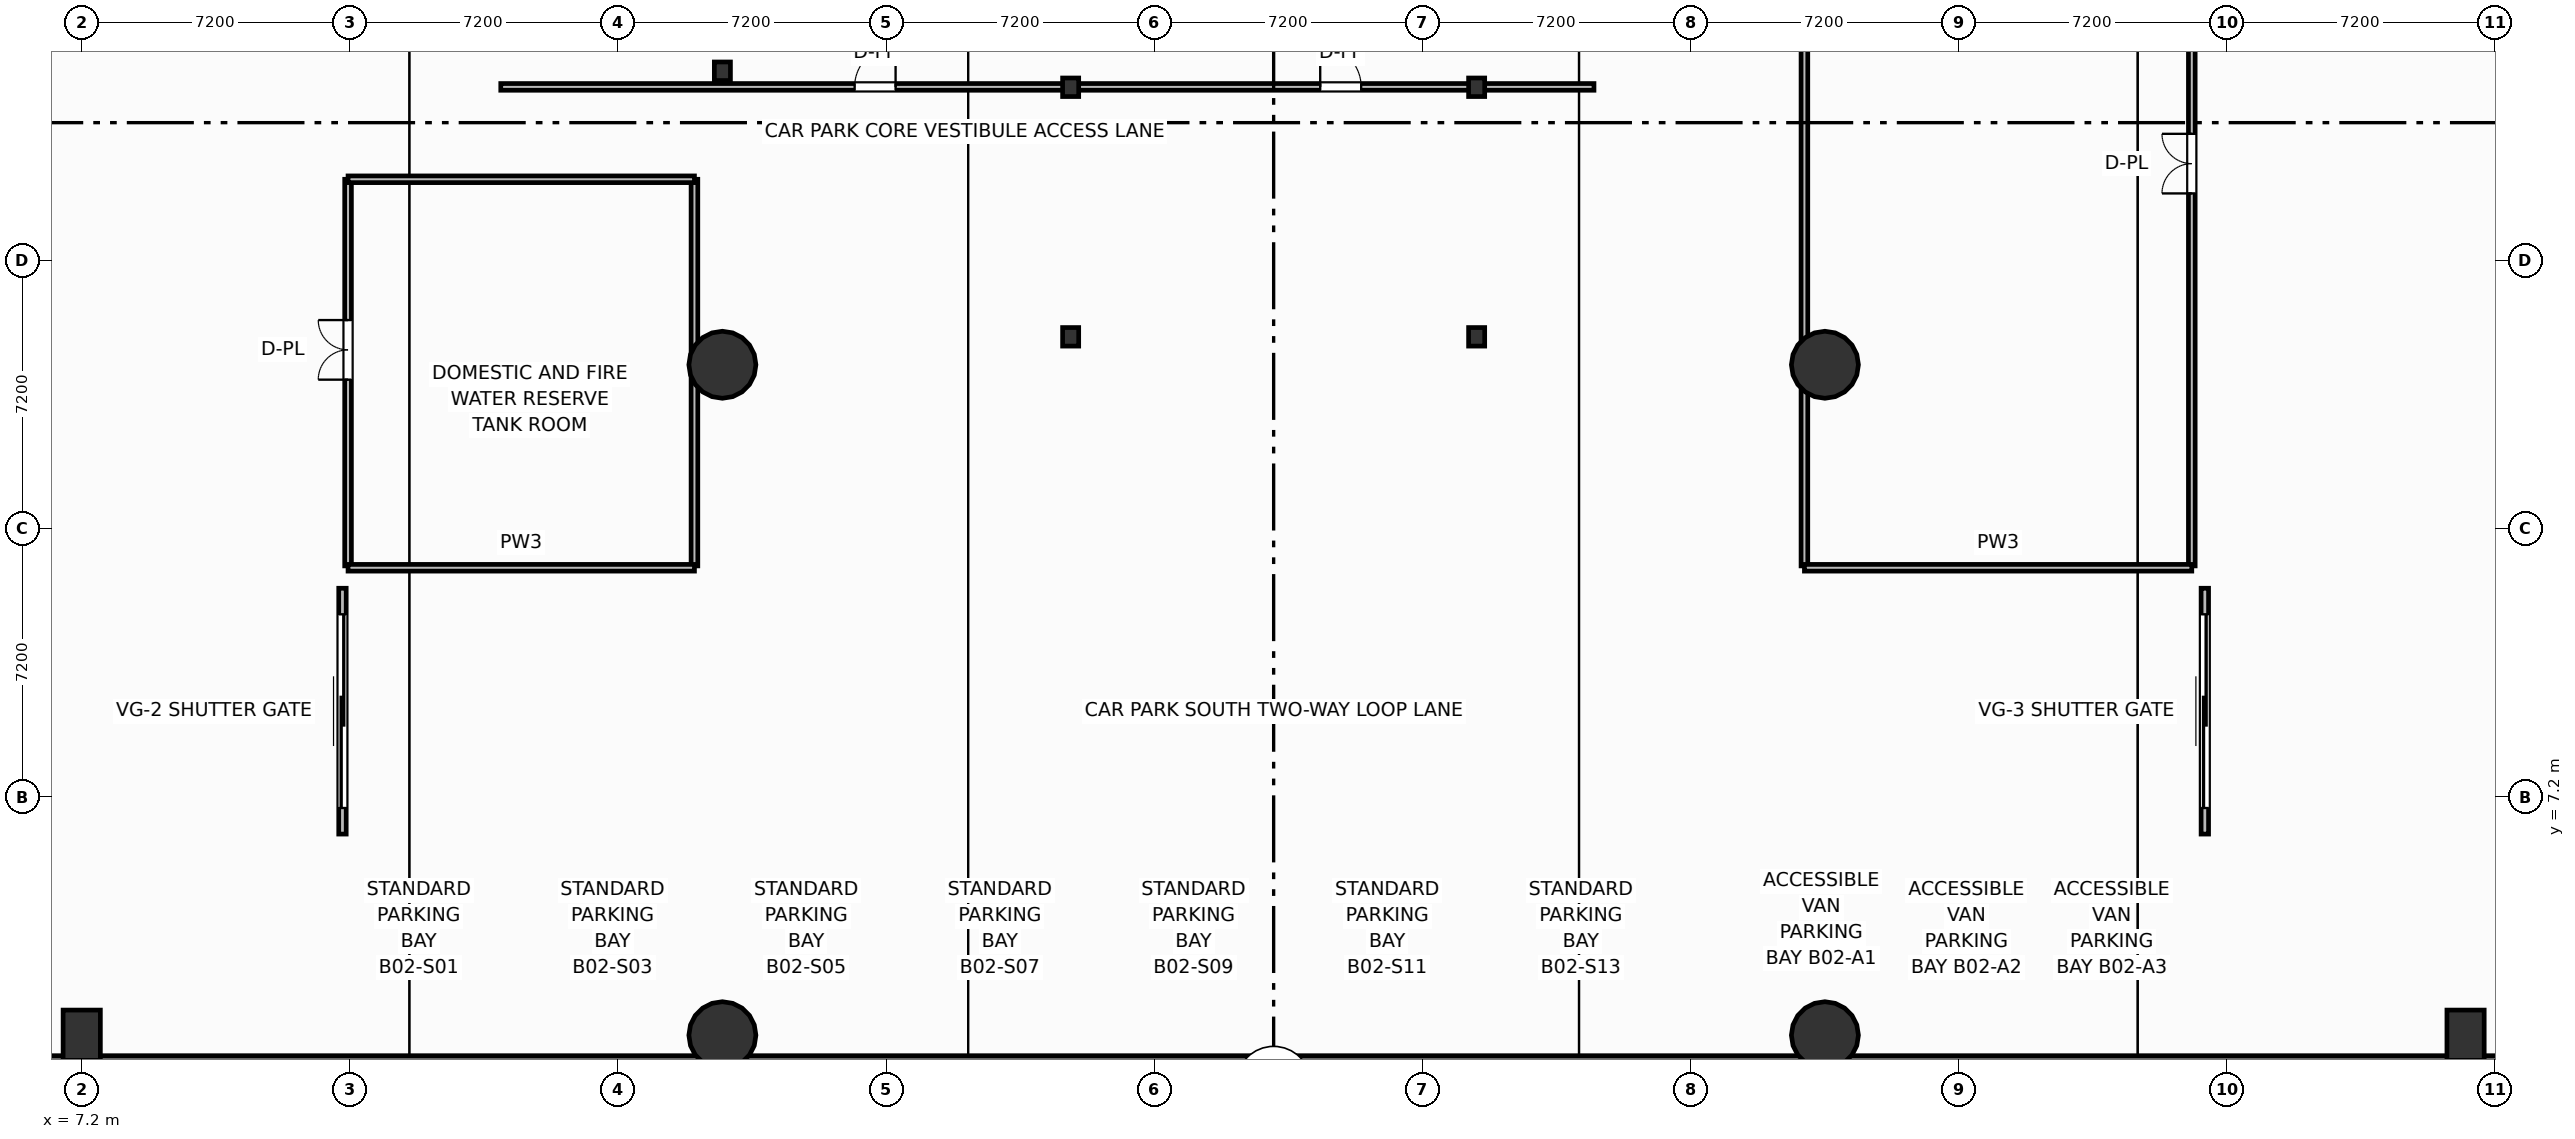
"""IFC4 building model, lengths in metres.
Left out: names, types, materials, properties, quantities, classifications, styles, units other than length and angle.
Written with IfcOpenShell. Run it as: python <this file> out.ifc"""

import sys

from ifc_helpers import new_model, si_unit, direction, frame, frame_2d, origin, origin_2d, place, context, subcontext, project, spatial, rectangle, circle, i_section, extrude, element, fill, save


model = new_model("IFC4")
c1 = context("Model", 3, precision=1e-05, world=origin(), true_north=direction((0.0, 1.0)))
c2 = subcontext(c1, "Body", "Model", "MODEL_VIEW")
j1 = project(units=[si_unit("LENGTHUNIT", "METRE"), si_unit("PLANEANGLEUNIT", "RADIAN")], contexts=[c1])
p1 = place(None, origin())
s1 = spatial("IfcSite", under=j1, at=p1, CompositionType="ELEMENT")
p2 = place(p1, origin())
s2 = spatial("IfcBuilding", under=s1, at=p2, CompositionType="ELEMENT")
p3 = place(p2, frame((0.0, 0.0, -9.0)))
s3 = spatial("IfcBuildingStorey", under=s2, at=p3, CompositionType="ELEMENT", Elevation=-9.0)
for number, where, z_axis, x_axis in (
    (1, (33.75, 19.55, 0.0), (0.0, 0.0, 1.0), (1.0, 0.0, 0.0)),
    (2, (44.65, 19.55, 0.0), (0.0, 0.0, 1.0), (1.0, 0.0, 0.0)),
    (3, (33.75, 26.25, 0.0), (0.0, 0.0, 1.0), (1.0, 0.0, 0.0)),
    (4, (44.65, 26.25, 0.0), (0.0, 0.0, 1.0), (1.0, 0.0, 0.0)),
    (5, (24.4, 26.68, 0.0), (0.0, 0.0, 1.0), (1.0, 0.0, 0.0)),
):
    element("IfcColumn", number, at=place(p3, frame(where, z_axis=z_axis, x_axis=x_axis)), inside=s3, PredefinedType="COLUMN", context=c2, shape_type="SweptSolid", body=[
        extrude(i_section(OverallWidth=0.432, OverallDepth=0.498, WebThickness=0.056, FlangeThickness=0.089, FilletRadius=0.025, at=origin_2d()), origin(), (0.0, 0.0, 1.0), 4.5),
    ])
p4 = place(p3, frame((7.2, 0.8, 0.0), z_axis=(0.0, 0.0, 1.0), x_axis=(1.0, 0.0, 0.0)))
e6 = element("IfcColumn", 6, at=p4, inside=s3, PredefinedType="COLUMN", context=c2, shape_type="SweptSolid", body=[
    extrude(rectangle(XDim=1.0, YDim=1.35, at=origin_2d()), origin(), (0.0, 0.0, 1.0), 4.5),
])
for number, where, z_axis, x_axis in (
    (7, (24.4, 0.8, 0.0), (0.0, 0.0, 1.0), (1.0, 0.0, 0.0)),
    (8, (54.0, 0.8, 0.0), (0.0, 0.0, 1.0), (1.0, 0.0, 0.0)),
):
    element("IfcColumn", number, at=place(p3, frame(where, z_axis=z_axis, x_axis=x_axis)), inside=s3, PredefinedType="COLUMN", context=c2, shape_type="SweptSolid", body=[
        extrude(circle(Radius=0.9, at=origin_2d()), origin(), (0.0, 0.0, 1.0), 4.5),
    ])
p5 = place(p3, frame((71.2, 0.8, 0.0), z_axis=(0.0, 0.0, 1.0), x_axis=(1.0, 0.0, 0.0)))
e9 = element("IfcColumn", 9, at=p5, inside=s3, PredefinedType="COLUMN", context=c2, shape_type="SweptSolid", body=[
    extrude(rectangle(XDim=1.0, YDim=1.35, at=origin_2d()), origin(), (0.0, 0.0, 1.0), 4.5),
])
for number, where, z_axis, x_axis in (
    (10, (24.4, 18.8, 0.0), (0.0, 0.0, 1.0), (1.0, 0.0, 0.0)),
    (11, (54.0, 18.8, 0.0), (0.0, 0.0, 1.0), (1.0, 0.0, 0.0)),
):
    element("IfcColumn", number, at=place(p3, frame(where, z_axis=z_axis, x_axis=x_axis)), inside=s3, PredefinedType="COLUMN", context=c2, shape_type="SweptSolid", body=[
        extrude(circle(Radius=0.9, at=origin_2d()), origin(), (0.0, 0.0, 1.0), 4.5),
    ])
p6 = place(p3, frame((72.8, 0.0, 0.0), z_axis=(0.0, 0.0, 1.0), x_axis=(-1.0, 0.0, 0.0)))
e12 = element("IfcWall", 12, at=p6, inside=s3, PredefinedType="SOLIDWALL", context=c2, shape_type="SweptSolid", body=[
    extrude(rectangle(XDim=67.2, YDim=0.5, at=frame_2d((33.6, 0.0))), origin(), (0.0, 0.0, 1.0), 4.2),
])
p7 = place(p3, frame((18.45, 26.26, 0.0), z_axis=(0.0, 0.0, 1.0), x_axis=(1.0, 0.0, 0.0)))
e13 = element("IfcWall", 13, at=p7, inside=s3, PredefinedType="PARTITIONING", context=c2, shape_type="SweptSolid", body=[
    extrude(rectangle(XDim=29.35, YDim=0.18, at=frame_2d((14.675, 0.0))), origin(), (0.0, 0.0, 1.0), 3.412),
])
p8 = place(p7, frame((9.5, 0.0, 0.0)))
e14 = element("IfcOpeningElement", 14, at=p8, cuts=e13, PredefinedType="OPENING", context=c2, shape_type="SweptSolid", body=[
    extrude(rectangle(XDim=1.1, YDim=2.15, at=frame_2d((0.55, 1.075))), frame((0.0, 0.1, 0.0), z_axis=(0.0, -1.0, 0.0), x_axis=(1.0, 0.0, 0.0)), (0.0, 0.0, 1.0), 0.2),
])
p9 = place(p7, frame((22.0, 0.0, 0.0)))
e15 = element("IfcOpeningElement", 15, at=p9, cuts=e13, PredefinedType="OPENING", context=c2, shape_type="SweptSolid", body=[
    extrude(rectangle(XDim=1.1, YDim=2.15, at=frame_2d((0.55, 1.075))), frame((0.0, 0.1, 0.0), z_axis=(0.0, -1.0, 0.0), x_axis=(1.0, 0.0, 0.0)), (0.0, 0.0, 1.0), 0.2),
])
p10 = place(p3, frame((14.2, 6.2, 0.0), z_axis=(0.0, 0.0, 1.0), x_axis=(0.0, 1.0, 0.0)))
e16 = element("IfcWall", 16, at=p10, inside=s3, PredefinedType="PARTITIONING", context=c2, shape_type="SweptSolid", body=[
    extrude(rectangle(XDim=6.6, YDim=0.2, at=frame_2d((3.3, 0.0))), origin(), (0.0, 0.0, 1.0), 4.2),
])
p11 = place(p10, frame((0.7, 0.0, 0.0)))
e17 = element("IfcOpeningElement", 17, at=p11, cuts=e16, PredefinedType="OPENING", context=c2, shape_type="SweptSolid", body=[
    extrude(rectangle(XDim=5.2, YDim=2.8, at=frame_2d((2.6, 1.4))), frame((0.0, 0.11, 0.0), z_axis=(0.0, -1.0, 0.0), x_axis=(1.0, 0.0, 0.0)), (0.0, 0.0, 1.0), 0.22),
])
p12 = place(p3, frame((64.2, 6.2, 0.0), z_axis=(0.0, 0.0, 1.0), x_axis=(0.0, 1.0, 0.0)))
e18 = element("IfcWall", 18, at=p12, inside=s3, PredefinedType="PARTITIONING", context=c2, shape_type="SweptSolid", body=[
    extrude(rectangle(XDim=6.6, YDim=0.2, at=frame_2d((3.3, 0.0))), origin(), (0.0, 0.0, 1.0), 4.2),
])
p13 = place(p12, frame((0.7, 0.0, 0.0)))
e19 = element("IfcOpeningElement", 19, at=p13, cuts=e18, PredefinedType="OPENING", context=c2, shape_type="SweptSolid", body=[
    extrude(rectangle(XDim=5.2, YDim=2.8, at=frame_2d((2.6, 1.4))), frame((0.0, 0.11, 0.0), z_axis=(0.0, -1.0, 0.0), x_axis=(1.0, 0.0, 0.0)), (0.0, 0.0, 1.0), 0.22),
])
p14 = place(p3, frame((14.35, 13.4, 0.0), z_axis=(0.0, 0.0, 1.0), x_axis=(0.0, 1.0, 0.0)))
e20 = element("IfcWall", 20, at=p14, inside=s3, PredefinedType="PARTITIONING", context=c2, shape_type="SweptSolid", body=[
    extrude(rectangle(XDim=10.38, YDim=0.18, at=frame_2d((5.19, 0.0))), origin(), (0.0, 0.0, 1.0), 4.2),
])
p15 = place(p14, frame((5.0, 0.0, 0.0)))
e21 = element("IfcOpeningElement", 21, at=p15, cuts=e20, PredefinedType="OPENING", context=c2, shape_type="SweptSolid", body=[
    extrude(rectangle(XDim=1.6, YDim=2.05, at=frame_2d((0.8, 1.025))), frame((0.0, 0.1, 0.0), z_axis=(0.0, -1.0, 0.0), x_axis=(1.0, 0.0, 0.0)), (0.0, 0.0, 1.0), 0.2),
])
p16 = place(p3, frame((23.65, 13.4, 0.0), z_axis=(0.0, 0.0, 1.0), x_axis=(0.0, 1.0, 0.0)))
e22 = element("IfcWall", 22, at=p16, inside=s3, PredefinedType="PARTITIONING", context=c2, shape_type="SweptSolid", body=[
    extrude(rectangle(XDim=10.38, YDim=0.18, at=frame_2d((5.19, 0.0))), origin(), (0.0, 0.0, 1.0), 4.2),
])
for number, where, z_axis, x_axis in (
    (23, (14.35, 13.35, 0.0), (0.0, 0.0, 1.0), (1.0, 0.0, 0.0)),
    (24, (14.35, 23.78, 0.0), (0.0, 0.0, 1.0), (1.0, 0.0, 0.0)),
):
    element("IfcWall", number, at=place(p3, frame(where, z_axis=z_axis, x_axis=x_axis)), inside=s3, PredefinedType="PARTITIONING", context=c2, shape_type="SweptSolid", body=[
        extrude(rectangle(XDim=9.3, YDim=0.18, at=frame_2d((4.65, 0.0))), origin(), (0.0, 0.0, 1.0), 4.2),
    ])
p17 = place(p3, frame((63.85, 13.4, 0.0), z_axis=(0.0, 0.0, 1.0), x_axis=(0.0, 1.0, 0.0)))
e25 = element("IfcWall", 25, at=p17, inside=s3, PredefinedType="PARTITIONING", context=c2, shape_type="SweptSolid", body=[
    extrude(rectangle(XDim=25.0, YDim=0.18, at=frame_2d((12.5, 0.0))), origin(), (0.0, 0.0, 1.0), 4.2),
])
p18 = place(p17, frame((10.0, 0.0, 0.0)))
e26 = element("IfcOpeningElement", 26, at=p18, cuts=e25, PredefinedType="OPENING", context=c2, shape_type="SweptSolid", body=[
    extrude(rectangle(XDim=1.6, YDim=2.05, at=frame_2d((0.8, 1.025))), frame((0.0, 0.1, 0.0), z_axis=(0.0, -1.0, 0.0), x_axis=(1.0, 0.0, 0.0)), (0.0, 0.0, 1.0), 0.2),
])
p19 = place(p3, frame((53.45, 13.4, 0.0), z_axis=(0.0, 0.0, 1.0), x_axis=(0.0, 1.0, 0.0)))
e27 = element("IfcWall", 27, at=p19, inside=s3, PredefinedType="PARTITIONING", context=c2, shape_type="SweptSolid", body=[
    extrude(rectangle(XDim=25.0, YDim=0.18, at=frame_2d((12.5, 0.0))), origin(), (0.0, 0.0, 1.0), 4.2),
])
p20 = place(p3, frame((53.45, 13.35, 0.0), z_axis=(0.0, 0.0, 1.0), x_axis=(1.0, 0.0, 0.0)))
e28 = element("IfcWall", 28, at=p20, inside=s3, PredefinedType="PARTITIONING", context=c2, shape_type="SweptSolid", body=[
    extrude(rectangle(XDim=10.4, YDim=0.18, at=frame_2d((5.2, 0.0))), origin(), (0.0, 0.0, 1.0), 4.2),
])
p21 = place(p8, origin())
e29 = element("IfcDoor", 29, at=p21, inside=s3, OperationType="SINGLE_SWING_RIGHT", PredefinedType="DOOR", context=c2, shape_type="SweptSolid", body=[
    extrude(rectangle(XDim=1.1, YDim=2.15, at=frame_2d((0.55, 1.075))), frame((0.0, 0.025, 0.0), z_axis=(0.0, -1.0, 0.0), x_axis=(1.0, 0.0, 0.0)), (0.0, 0.0, 1.0), 0.05),
])
fill(e14, e29)
p22 = place(p9, origin())
e30 = element("IfcDoor", 30, at=p22, inside=s3, OperationType="SINGLE_SWING_LEFT", PredefinedType="DOOR", context=c2, shape_type="SweptSolid", body=[
    extrude(rectangle(XDim=1.1, YDim=2.15, at=frame_2d((0.55, 1.075))), frame((0.0, 0.025, 0.0), z_axis=(0.0, -1.0, 0.0), x_axis=(1.0, 0.0, 0.0)), (0.0, 0.0, 1.0), 0.05),
])
fill(e15, e30)
p23 = place(p11, origin())
e31 = element("IfcDoor", 31, at=p23, inside=s3, OperationType="SLIDING_TO_LEFT", PredefinedType="GATE", context=c2, shape_type="SweptSolid", body=[
    extrude(rectangle(XDim=5.2, YDim=2.8, at=frame_2d((2.6, 1.4))), frame((0.0, 0.025, 0.0), z_axis=(0.0, -1.0, 0.0), x_axis=(1.0, 0.0, 0.0)), (0.0, 0.0, 1.0), 0.05),
])
fill(e17, e31)
p24 = place(p13, origin())
e32 = element("IfcDoor", 32, at=p24, inside=s3, OperationType="SLIDING_TO_LEFT", PredefinedType="GATE", context=c2, shape_type="SweptSolid", body=[
    extrude(rectangle(XDim=5.2, YDim=2.8, at=frame_2d((2.6, 1.4))), frame((0.0, 0.025, 0.0), z_axis=(0.0, -1.0, 0.0), x_axis=(1.0, 0.0, 0.0)), (0.0, 0.0, 1.0), 0.05),
])
fill(e19, e32)
p25 = place(p15, origin())
e33 = element("IfcDoor", 33, at=p25, inside=s3, OperationType="DOUBLE_DOOR_SINGLE_SWING", PredefinedType="DOOR", context=c2, shape_type="SweptSolid", body=[
    extrude(rectangle(XDim=1.6, YDim=2.05, at=frame_2d((0.8, 1.025))), frame((0.0, 0.025, 0.0), z_axis=(0.0, -1.0, 0.0), x_axis=(1.0, 0.0, 0.0)), (0.0, 0.0, 1.0), 0.05),
])
fill(e21, e33)
p26 = place(p18, origin())
e34 = element("IfcDoor", 34, at=p26, inside=s3, OperationType="DOUBLE_DOOR_SINGLE_SWING", PredefinedType="DOOR", context=c2, shape_type="SweptSolid", body=[
    extrude(rectangle(XDim=1.6, YDim=2.05, at=frame_2d((0.8, 1.025))), frame((0.0, 0.025, 0.0), z_axis=(0.0, -1.0, 0.0), x_axis=(1.0, 0.0, 0.0)), (0.0, 0.0, 1.0), 0.05),
])
fill(e26, e34)
save(model, sys.argv[1])
